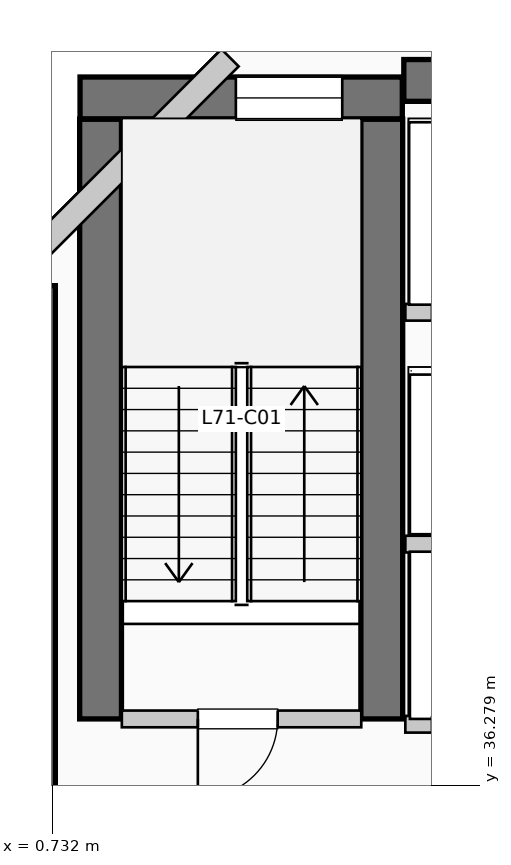
"""IFC4 building model, lengths in metres.
Left out: names, types, materials, properties, quantities, classifications, styles, units other than length and angle.
Written with IfcOpenShell. Run it as: python <this file> out.ifc"""

import sys

from ifc_helpers import new_model, si_unit, direction, frame, frame_2d, origin, place, context, subcontext, project, spatial, rectangle, extrude, element, fill, save


model = new_model("IFC4")
c1 = context("Model", 3, precision=1e-05, world=origin(), true_north=direction((0.0, 1.0)))
c2 = subcontext(c1, "Body", "Model", "MODEL_VIEW")
j1 = project(units=[si_unit("LENGTHUNIT", "METRE"), si_unit("PLANEANGLEUNIT", "RADIAN")], contexts=[c1])
p1 = place(None, origin())
s1 = spatial("IfcSite", under=j1, at=p1, CompositionType="ELEMENT")
p2 = place(p1, origin())
s2 = spatial("IfcBuilding", under=s1, at=p2, CompositionType="ELEMENT")
p3 = place(p2, frame((0.0, 0.0, 292.05)))
s3 = spatial("IfcBuildingStorey", under=s2, at=p3, CompositionType="ELEMENT", Elevation=292.05)
p4 = place(p3, frame((5.36, 45.55, 0.0), z_axis=(0.0, 0.0, 1.0), x_axis=(1.0, 0.0, 0.0)))
e1 = element("IfcWall", 1, at=p4, inside=s3, PredefinedType="SHEAR", context=c2, shape_type="SweptSolid", body=[
    extrude(rectangle(XDim=13.98, YDim=0.55, at=frame_2d((6.99, 0.0))), origin(), (0.0, 0.0, 1.0), 3.96),
])
p5 = place(p3, frame((0.5, 34.95, 0.0), z_axis=(0.0, 0.0, 1.0), x_axis=(0.0, 1.0, 0.0)))
e2 = element("IfcWall", 2, at=p5, inside=s3, PredefinedType="SHEAR", context=c2, shape_type="SweptSolid", body=[
    extrude(rectangle(XDim=7.9, YDim=0.55, at=frame_2d((3.95, 0.0))), origin(), (0.0, 0.0, 1.0), 3.96),
])
for number, where, z_axis, x_axis in (
    (3, (1.37, 37.15, 0.0), (0.0, 0.0, 1.0), (0.0, 1.0, 0.0)),
    (4, (5.07, 37.15, 0.0), (0.0, 0.0, 1.0), (0.0, 1.0, 0.0)),
):
    element("IfcWall", number, at=place(p3, frame(where, z_axis=z_axis, x_axis=x_axis)), inside=s3, PredefinedType="SHEAR", context=c2, shape_type="SweptSolid", body=[
        extrude(rectangle(XDim=7.89, YDim=0.55, at=frame_2d((3.945, 0.0))), origin(), (0.0, 0.0, 1.0), 3.96),
    ])
p6 = place(p3, frame((1.1, 45.32, 0.0), z_axis=(0.0, 0.0, 1.0), x_axis=(1.0, 0.0, 0.0)))
e5 = element("IfcWall", 5, at=p6, inside=s3, PredefinedType="SHEAR", context=c2, shape_type="SweptSolid", body=[
    extrude(rectangle(XDim=4.24, YDim=0.55, at=frame_2d((2.12, 0.0))), origin(), (0.0, 0.0, 1.0), 3.96),
])
p7 = place(p6, frame((2.05, 0.0, 1.05)))
e6 = element("IfcOpeningElement", 6, at=p7, cuts=e5, PredefinedType="OPENING", context=c2, shape_type="SweptSolid", body=[
    extrude(rectangle(XDim=1.4, YDim=1.8, at=frame_2d((0.7, 0.9))), frame((0.0, 0.285, 0.0), z_axis=(0.0, -1.0, 0.0), x_axis=(1.0, 0.0, 0.0)), (0.0, 0.0, 1.0), 0.57),
])
p8 = place(p3, frame((3.074, 45.848, 0.0), z_axis=(0.0, 0.0, 1.0), x_axis=(-0.707106781187, -0.707106781187, 0.0)))
e7 = element("IfcWall", 7, at=p8, inside=s3, PredefinedType="SOLIDWALL", context=c2, shape_type="SweptSolid", body=[
    extrude(rectangle(XDim=4.133, YDim=0.32, at=frame_2d((2.066, 0.0))), origin(), (0.0, 0.0, 1.0), 3.74),
])
p9 = place(p3, frame((1.65, 37.15, 0.0), z_axis=(0.0, 0.0, 1.0), x_axis=(1.0, 0.0, 0.0)))
e8 = element("IfcWall", 8, at=p9, inside=s3, PredefinedType="PARTITIONING", context=c2, shape_type="SweptSolid", body=[
    extrude(rectangle(XDim=3.15, YDim=0.22, at=frame_2d((1.575, 0.0))), origin(), (0.0, 0.0, 1.0), 3.74),
])
p10 = place(p9, frame((2.05, 0.0, 0.0), z_axis=(0.0, 0.0, 1.0), x_axis=(-1.0, 0.0, 0.0)))
e9 = element("IfcOpeningElement", 9, at=p10, cuts=e8, PredefinedType="OPENING", context=c2, shape_type="SweptSolid", body=[
    extrude(rectangle(XDim=1.05, YDim=2.15, at=frame_2d((0.525, 1.075))), frame((0.0, 0.12, 0.0), z_axis=(0.0, -1.0, 0.0), x_axis=(1.0, 0.0, 0.0)), (0.0, 0.0, 1.0), 0.24),
])
p11 = place(p3, frame((5.38, 37.08, 0.0), z_axis=(0.0, 0.0, 1.0), x_axis=(1.0, 0.0, 0.0)))
e10 = element("IfcWall", 10, at=p11, inside=s3, PredefinedType="PARTITIONING", context=c2, shape_type="SweptSolid", body=[
    extrude(rectangle(XDim=3.46, YDim=0.22, at=frame_2d((1.73, 0.0))), origin(), (0.0, 0.0, 1.0), 3.74),
])
p12 = place(p11, frame((1.55, 0.0, 0.0), z_axis=(0.0, 0.0, 1.0), x_axis=(-1.0, 0.0, 0.0)))
e11 = element("IfcOpeningElement", 11, at=p12, cuts=e10, PredefinedType="OPENING", context=c2, shape_type="SweptSolid", body=[
    extrude(rectangle(XDim=1.2, YDim=2.2, at=frame_2d((0.6, 1.1))), frame((0.0, 0.12, 0.0), z_axis=(0.0, -1.0, 0.0), x_axis=(1.0, 0.0, 0.0)), (0.0, 0.0, 1.0), 0.24),
])
p13 = place(p11, frame((3.22, 0.0, 0.0), z_axis=(0.0, 0.0, 1.0), x_axis=(-1.0, 0.0, 0.0)))
e12 = element("IfcOpeningElement", 12, at=p13, cuts=e10, PredefinedType="OPENING", context=c2, shape_type="SweptSolid", body=[
    extrude(rectangle(XDim=1.2, YDim=2.2, at=frame_2d((0.6, 1.1))), frame((0.0, 0.12, 0.0), z_axis=(0.0, -1.0, 0.0), x_axis=(1.0, 0.0, 0.0)), (0.0, 0.0, 1.0), 0.24),
])
p14 = place(p3, frame((5.38, 39.45, 0.0), z_axis=(0.0, 0.0, 1.0), x_axis=(1.0, 0.0, 0.0)))
e13 = element("IfcWall", 13, at=p14, inside=s3, PredefinedType="PARTITIONING", context=c2, shape_type="SweptSolid", body=[
    extrude(rectangle(XDim=3.46, YDim=0.22, at=frame_2d((1.73, 0.0))), origin(), (0.0, 0.0, 1.0), 3.74),
])
p15 = place(p3, frame((5.38, 42.5, 0.0), z_axis=(0.0, 0.0, 1.0), x_axis=(1.0, 0.0, 0.0)))
e14 = element("IfcWall", 14, at=p15, inside=s3, PredefinedType="PARTITIONING", context=c2, shape_type="SweptSolid", body=[
    extrude(rectangle(XDim=3.77, YDim=0.22, at=frame_2d((1.885, 0.0))), origin(), (0.0, 0.0, 1.0), 3.74),
])
p16 = place(p15, frame((1.75, 0.0, 0.0), z_axis=(0.0, 0.0, 1.0), x_axis=(-1.0, 0.0, 0.0)))
e15 = element("IfcOpeningElement", 15, at=p16, cuts=e14, PredefinedType="OPENING", context=c2, shape_type="SweptSolid", body=[
    extrude(rectangle(XDim=1.4, YDim=2.2, at=frame_2d((0.7, 1.1))), frame((0.0, 0.12, 0.0), z_axis=(0.0, -1.0, 0.0), x_axis=(1.0, 0.0, 0.0)), (0.0, 0.0, 1.0), 0.24),
])
p17 = place(p15, frame((3.53, 0.0, 0.0), z_axis=(0.0, 0.0, 1.0), x_axis=(-1.0, 0.0, 0.0)))
e16 = element("IfcOpeningElement", 16, at=p17, cuts=e14, PredefinedType="OPENING", context=c2, shape_type="SweptSolid", body=[
    extrude(rectangle(XDim=1.4, YDim=2.2, at=frame_2d((0.7, 1.1))), frame((0.0, 0.12, 0.0), z_axis=(0.0, -1.0, 0.0), x_axis=(1.0, 0.0, 0.0)), (0.0, 0.0, 1.0), 0.24),
])
p18 = place(p7, origin())
e17 = element("IfcWindow", 17, at=p18, inside=s3, PartitioningType="SINGLE_PANEL", PredefinedType="WINDOW", context=c2, shape_type="SweptSolid", body=[
    extrude(rectangle(XDim=1.4, YDim=1.8, at=frame_2d((0.7, 0.9))), frame((0.0, 0.03, 0.0), z_axis=(0.0, -1.0, 0.0), x_axis=(1.0, 0.0, 0.0)), (0.0, 0.0, 1.0), 0.06),
])
fill(e6, e17)
p19 = place(p10, origin())
e18 = element("IfcDoor", 18, at=p19, inside=s3, OperationType="SINGLE_SWING_LEFT", PredefinedType="DOOR", context=c2, shape_type="SweptSolid", body=[
    extrude(rectangle(XDim=1.05, YDim=2.15, at=frame_2d((0.525, 1.075))), frame((0.0, 0.025, 0.0), z_axis=(0.0, -1.0, 0.0), x_axis=(1.0, 0.0, 0.0)), (0.0, 0.0, 1.0), 0.05),
])
fill(e9, e18)
save(model, sys.argv[1])
